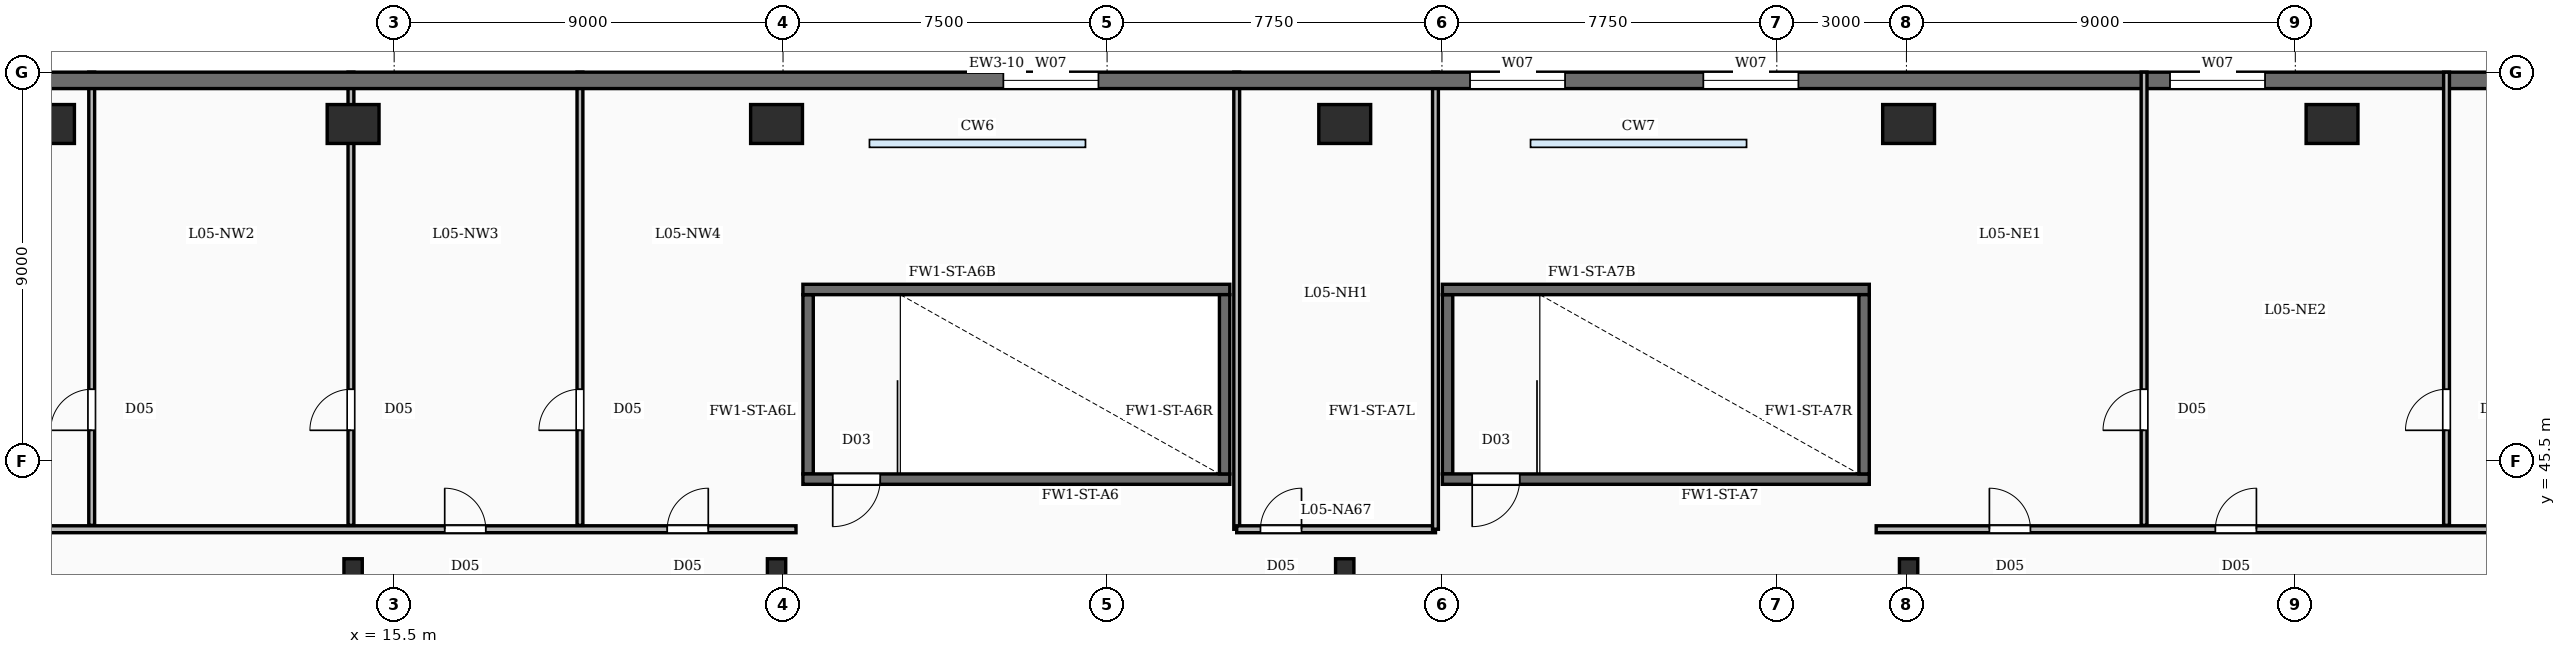
"""IFC4 building model, lengths in metres.
Left out: names, types, materials, properties, quantities, classifications, styles, units other than length and angle.
Written with IfcOpenShell. Run it as: python <this file> out.ifc"""

import sys

from ifc_helpers import new_model, si_unit, direction, frame, frame_2d, origin, origin_2d, place, context, subcontext, project, spatial, rectangle, i_section, extrude, element, fill, save


model = new_model("IFC4")
c1 = context("Model", 3, precision=1e-05, world=origin(), true_north=direction((0.0, 1.0)))
c2 = subcontext(c1, "Body", "Model", "MODEL_VIEW")
j1 = project(units=[si_unit("LENGTHUNIT", "METRE"), si_unit("PLANEANGLEUNIT", "RADIAN")], contexts=[c1])
p1 = place(None, origin())
s1 = spatial("IfcSite", under=j1, at=p1, CompositionType="ELEMENT")
p2 = place(p1, origin())
s2 = spatial("IfcBuilding", under=s1, at=p2, CompositionType="ELEMENT")
p3 = place(p2, frame((0.0, 0.0, 28.0)))
s3 = spatial("IfcBuildingStorey", under=s2, at=p3, CompositionType="ELEMENT", Elevation=28.0)
for number, where, z_axis, x_axis in (
    (1, (60.35, 53.3, -0.35), (0.0, 0.0, 1.0), (1.0, 0.0, 0.0)),
    (2, (50.55, 53.3, -0.35), (0.0, 0.0, 1.0), (1.0, 0.0, 0.0)),
    (3, (37.5, 53.3, -0.35), (0.0, 0.0, 1.0), (1.0, 0.0, 0.0)),
    (4, (24.35, 53.3, -0.35), (0.0, 0.0, 1.0), (1.0, 0.0, 0.0)),
    (5, (14.55, 53.3, -0.35), (0.0, 0.0, 1.0), (1.0, 0.0, 0.0)),
    (6, (7.5, 53.3, -0.35), (0.0, 0.0, 1.0), (1.0, 0.0, 0.0)),
):
    element("IfcColumn", number, at=place(p3, frame(where, z_axis=z_axis, x_axis=x_axis)), inside=s3, PredefinedType="COLUMN", context=c2, shape_type="SweptSolid", body=[
        extrude(rectangle(XDim=1.2, YDim=0.9, at=origin_2d()), origin(), (0.0, 0.0, 1.0), 5.9),
    ])
for number, where, z_axis, x_axis in (
    (7, (14.55, 43.0, -0.35), (0.0, 0.0, 1.0), (1.0, 0.0, 0.0)),
    (8, (24.35, 43.0, -0.35), (0.0, 0.0, 1.0), (1.0, 0.0, 0.0)),
    (9, (37.5, 43.0, -0.35), (0.0, 0.0, 1.0), (1.0, 0.0, 0.0)),
    (10, (50.55, 43.0, -0.35), (0.0, 0.0, 1.0), (1.0, 0.0, 0.0)),
):
    element("IfcColumn", number, at=place(p3, frame(where, z_axis=z_axis, x_axis=x_axis)), inside=s3, PredefinedType="COLUMN", context=c2, shape_type="SweptSolid", body=[
        extrude(i_section(OverallWidth=0.424, OverallDepth=0.474, WebThickness=0.048, FlangeThickness=0.077, FilletRadius=0.02, at=origin_2d()), origin(), (0.0, 0.0, 1.0), 5.9),
    ])
p4 = place(p3, frame((5.4, 54.31, 0.0), z_axis=(0.0, 0.0, 1.0), x_axis=(1.0, 0.0, 0.0)))
e11 = element("IfcWall", 11, at=p4, inside=s3, PredefinedType="SOLIDWALL", context=c2, shape_type="SweptSolid", body=[
    extrude(rectangle(XDim=68.7, YDim=0.38, at=frame_2d((34.35, 0.0))), origin(), (0.0, 0.0, 1.0), 5.55),
])
p5 = place(p4, frame((24.2, 0.0, 0.95)))
e12 = element("IfcOpeningElement", 12, at=p5, cuts=e11, PredefinedType="OPENING", context=c2, shape_type="SweptSolid", body=[
    extrude(rectangle(XDim=2.2, YDim=2.5, at=frame_2d((1.1, 1.25))), frame((0.0, 0.2, 0.0), z_axis=(0.0, -1.0, 0.0), x_axis=(1.0, 0.0, 0.0)), (0.0, 0.0, 1.0), 0.4),
])
p6 = place(p4, frame((35.0, 0.0, 0.95)))
e13 = element("IfcOpeningElement", 13, at=p6, cuts=e11, PredefinedType="OPENING", context=c2, shape_type="SweptSolid", body=[
    extrude(rectangle(XDim=2.2, YDim=2.5, at=frame_2d((1.1, 1.25))), frame((0.0, 0.2, 0.0), z_axis=(0.0, -1.0, 0.0), x_axis=(1.0, 0.0, 0.0)), (0.0, 0.0, 1.0), 0.4),
])
p7 = place(p4, frame((40.4, 0.0, 0.95)))
e14 = element("IfcOpeningElement", 14, at=p7, cuts=e11, PredefinedType="OPENING", context=c2, shape_type="SweptSolid", body=[
    extrude(rectangle(XDim=2.2, YDim=2.5, at=frame_2d((1.1, 1.25))), frame((0.0, 0.2, 0.0), z_axis=(0.0, -1.0, 0.0), x_axis=(1.0, 0.0, 0.0)), (0.0, 0.0, 1.0), 0.4),
])
p8 = place(p4, frame((51.2, 0.0, 0.95)))
e15 = element("IfcOpeningElement", 15, at=p8, cuts=e11, PredefinedType="OPENING", context=c2, shape_type="SweptSolid", body=[
    extrude(rectangle(XDim=2.2, YDim=2.5, at=frame_2d((1.1, 1.25))), frame((0.0, 0.2, 0.0), z_axis=(0.0, -1.0, 0.0), x_axis=(1.0, 0.0, 0.0)), (0.0, 0.0, 1.0), 0.4),
])
p9 = place(p3, frame((34.84, 45.08, 0.0), z_axis=(0.0, 0.0, 1.0), x_axis=(-1.0, 0.0, 0.0)))
e16 = element("IfcWall", 16, at=p9, inside=s3, PredefinedType="SOLIDWALL", context=c2, shape_type="SweptSolid", body=[
    extrude(rectangle(XDim=9.88, YDim=0.24, at=frame_2d((4.94, 0.0))), origin(), (0.0, 0.0, 1.0), 5.55),
])
p10 = place(p9, frame((8.09, 0.0, 0.0)))
e17 = element("IfcOpeningElement", 17, at=p10, cuts=e16, PredefinedType="OPENING", context=c2, shape_type="SweptSolid", body=[
    extrude(rectangle(XDim=1.1, YDim=2.15, at=frame_2d((0.55, 1.075))), frame((0.0, 0.13, 0.0), z_axis=(0.0, -1.0, 0.0), x_axis=(1.0, 0.0, 0.0)), (0.0, 0.0, 1.0), 0.26),
])
p11 = place(p3, frame((24.96, 49.47, 0.0), z_axis=(0.0, 0.0, 1.0), x_axis=(1.0, 0.0, 0.0)))
e18 = element("IfcWall", 18, at=p11, inside=s3, PredefinedType="SOLIDWALL", context=c2, shape_type="SweptSolid", body=[
    extrude(rectangle(XDim=9.88, YDim=0.24, at=frame_2d((4.94, 0.0))), origin(), (0.0, 0.0, 1.0), 5.55),
])
for number, where, z_axis, x_axis in (
    (19, (25.08, 45.2, 0.0), (0.0, 0.0, 1.0), (0.0, 1.0, 0.0)),
    (20, (34.72, 45.2, 0.0), (0.0, 0.0, 1.0), (0.0, 1.0, 0.0)),
):
    element("IfcWall", number, at=place(p3, frame(where, z_axis=z_axis, x_axis=x_axis)), inside=s3, PredefinedType="SOLIDWALL", context=c2, shape_type="SweptSolid", body=[
        extrude(rectangle(XDim=4.15, YDim=0.24, at=frame_2d((2.075, 0.0))), origin(), (0.0, 0.0, 1.0), 5.55),
    ])
p12 = place(p3, frame((49.64, 45.08, 0.0), z_axis=(0.0, 0.0, 1.0), x_axis=(-1.0, 0.0, 0.0)))
e21 = element("IfcWall", 21, at=p12, inside=s3, PredefinedType="SOLIDWALL", context=c2, shape_type="SweptSolid", body=[
    extrude(rectangle(XDim=9.88, YDim=0.24, at=frame_2d((4.94, 0.0))), origin(), (0.0, 0.0, 1.0), 5.55),
])
p13 = place(p12, frame((8.09, 0.0, 0.0)))
e22 = element("IfcOpeningElement", 22, at=p13, cuts=e21, PredefinedType="OPENING", context=c2, shape_type="SweptSolid", body=[
    extrude(rectangle(XDim=1.1, YDim=2.15, at=frame_2d((0.55, 1.075))), frame((0.0, 0.13, 0.0), z_axis=(0.0, -1.0, 0.0), x_axis=(1.0, 0.0, 0.0)), (0.0, 0.0, 1.0), 0.26),
])
p14 = place(p3, frame((39.76, 49.47, 0.0), z_axis=(0.0, 0.0, 1.0), x_axis=(1.0, 0.0, 0.0)))
e23 = element("IfcWall", 23, at=p14, inside=s3, PredefinedType="SOLIDWALL", context=c2, shape_type="SweptSolid", body=[
    extrude(rectangle(XDim=9.88, YDim=0.24, at=frame_2d((4.94, 0.0))), origin(), (0.0, 0.0, 1.0), 5.55),
])
for number, where, z_axis, x_axis in (
    (24, (39.88, 45.2, 0.0), (0.0, 0.0, 1.0), (0.0, 1.0, 0.0)),
    (25, (49.52, 45.2, 0.0), (0.0, 0.0, 1.0), (0.0, 1.0, 0.0)),
):
    element("IfcWall", number, at=place(p3, frame(where, z_axis=z_axis, x_axis=x_axis)), inside=s3, PredefinedType="SOLIDWALL", context=c2, shape_type="SweptSolid", body=[
        extrude(rectangle(XDim=4.15, YDim=0.24, at=frame_2d((2.075, 0.0))), origin(), (0.0, 0.0, 1.0), 5.55),
    ])
p15 = place(p3, frame((8.5, 44.01, 0.0), z_axis=(0.0, 0.0, 1.0), x_axis=(0.0, 1.0, 0.0)))
e26 = element("IfcWall", 26, at=p15, inside=s3, PredefinedType="PARTITIONING", context=c2, shape_type="SweptSolid", body=[
    extrude(rectangle(XDim=10.49, YDim=0.135, at=frame_2d((5.245, 0.0))), origin(), (0.0, 0.0, 1.0), 4.61),
])
p16 = place(p15, frame((2.2, 0.0, 0.0)))
e27 = element("IfcOpeningElement", 27, at=p16, cuts=e26, PredefinedType="OPENING", context=c2, shape_type="SweptSolid", body=[
    extrude(rectangle(XDim=0.95, YDim=2.15, at=frame_2d((0.475, 1.075))), frame((0.0, 0.077, 0.0), z_axis=(0.0, -1.0, 0.0), x_axis=(1.0, 0.0, 0.0)), (0.0, 0.0, 1.0), 0.155),
])
p17 = place(p3, frame((14.5, 44.01, 0.0), z_axis=(0.0, 0.0, 1.0), x_axis=(0.0, 1.0, 0.0)))
e28 = element("IfcWall", 28, at=p17, inside=s3, PredefinedType="PARTITIONING", context=c2, shape_type="SweptSolid", body=[
    extrude(rectangle(XDim=10.49, YDim=0.135, at=frame_2d((5.245, 0.0))), origin(), (0.0, 0.0, 1.0), 3.6),
])
p18 = place(p17, frame((2.2, 0.0, 0.0)))
e29 = element("IfcOpeningElement", 29, at=p18, cuts=e28, PredefinedType="OPENING", context=c2, shape_type="SweptSolid", body=[
    extrude(rectangle(XDim=0.95, YDim=2.15, at=frame_2d((0.475, 1.075))), frame((0.0, 0.077, 0.0), z_axis=(0.0, -1.0, 0.0), x_axis=(1.0, 0.0, 0.0)), (0.0, 0.0, 1.0), 0.155),
])
p19 = place(p3, frame((19.8, 44.01, 0.0), z_axis=(0.0, 0.0, 1.0), x_axis=(0.0, 1.0, 0.0)))
e30 = element("IfcWall", 30, at=p19, inside=s3, PredefinedType="PARTITIONING", context=c2, shape_type="SweptSolid", body=[
    extrude(rectangle(XDim=10.49, YDim=0.135, at=frame_2d((5.245, 0.0))), origin(), (0.0, 0.0, 1.0), 4.61),
])
p20 = place(p19, frame((2.2, 0.0, 0.0)))
e31 = element("IfcOpeningElement", 31, at=p20, cuts=e30, PredefinedType="OPENING", context=c2, shape_type="SweptSolid", body=[
    extrude(rectangle(XDim=0.95, YDim=2.15, at=frame_2d((0.475, 1.075))), frame((0.0, 0.077, 0.0), z_axis=(0.0, -1.0, 0.0), x_axis=(1.0, 0.0, 0.0)), (0.0, 0.0, 1.0), 0.155),
])
p21 = place(p3, frame((0.0, 43.92, 0.0), z_axis=(0.0, 0.0, 1.0), x_axis=(1.0, 0.0, 0.0)))
e32 = element("IfcWall", 32, at=p21, inside=s3, PredefinedType="PARTITIONING", context=c2, shape_type="SweptSolid", body=[
    extrude(rectangle(XDim=24.8, YDim=0.16, at=frame_2d((12.4, 0.0))), origin(), (0.0, 0.0, 1.0), 4.61),
])
p22 = place(p21, frame((16.67, 0.0, 0.0)))
e33 = element("IfcOpeningElement", 33, at=p22, cuts=e32, PredefinedType="OPENING", context=c2, shape_type="SweptSolid", body=[
    extrude(rectangle(XDim=0.95, YDim=2.15, at=frame_2d((0.475, 1.075))), frame((0.0, 0.09, 0.0), z_axis=(0.0, -1.0, 0.0), x_axis=(1.0, 0.0, 0.0)), (0.0, 0.0, 1.0), 0.18),
])
p23 = place(p21, frame((21.82, 0.0, 0.0)))
e34 = element("IfcOpeningElement", 34, at=p23, cuts=e32, PredefinedType="OPENING", context=c2, shape_type="SweptSolid", body=[
    extrude(rectangle(XDim=0.95, YDim=2.15, at=frame_2d((0.475, 1.075))), frame((0.0, 0.09, 0.0), z_axis=(0.0, -1.0, 0.0), x_axis=(1.0, 0.0, 0.0)), (0.0, 0.0, 1.0), 0.18),
])
p24 = place(p3, frame((56.0, 44.01, 0.0), z_axis=(0.0, 0.0, 1.0), x_axis=(0.0, 1.0, 0.0)))
e35 = element("IfcWall", 35, at=p24, inside=s3, PredefinedType="PARTITIONING", context=c2, shape_type="SweptSolid", body=[
    extrude(rectangle(XDim=10.49, YDim=0.135, at=frame_2d((5.245, 0.0))), origin(), (0.0, 0.0, 1.0), 4.61),
])
p25 = place(p24, frame((2.2, 0.0, 0.0)))
e36 = element("IfcOpeningElement", 36, at=p25, cuts=e35, PredefinedType="OPENING", context=c2, shape_type="SweptSolid", body=[
    extrude(rectangle(XDim=0.95, YDim=2.15, at=frame_2d((0.475, 1.075))), frame((0.0, 0.077, 0.0), z_axis=(0.0, -1.0, 0.0), x_axis=(1.0, 0.0, 0.0)), (0.0, 0.0, 1.0), 0.155),
])
p26 = place(p3, frame((63.0, 44.01, 0.0), z_axis=(0.0, 0.0, 1.0), x_axis=(0.0, 1.0, 0.0)))
e37 = element("IfcWall", 37, at=p26, inside=s3, PredefinedType="PARTITIONING", context=c2, shape_type="SweptSolid", body=[
    extrude(rectangle(XDim=10.49, YDim=0.135, at=frame_2d((5.245, 0.0))), origin(), (0.0, 0.0, 1.0), 4.61),
])
p27 = place(p26, frame((2.2, 0.0, 0.0)))
e38 = element("IfcOpeningElement", 38, at=p27, cuts=e37, PredefinedType="OPENING", context=c2, shape_type="SweptSolid", body=[
    extrude(rectangle(XDim=0.95, YDim=2.15, at=frame_2d((0.475, 1.075))), frame((0.0, 0.077, 0.0), z_axis=(0.0, -1.0, 0.0), x_axis=(1.0, 0.0, 0.0)), (0.0, 0.0, 1.0), 0.155),
])
p28 = place(p3, frame((49.8, 43.92, 0.0), z_axis=(0.0, 0.0, 1.0), x_axis=(1.0, 0.0, 0.0)))
e39 = element("IfcWall", 39, at=p28, inside=s3, PredefinedType="PARTITIONING", context=c2, shape_type="SweptSolid", body=[
    extrude(rectangle(XDim=29.7, YDim=0.16, at=frame_2d((14.85, 0.0))), origin(), (0.0, 0.0, 1.0), 4.61),
])
p29 = place(p28, frame((2.62, 0.0, 0.0)))
e40 = element("IfcOpeningElement", 40, at=p29, cuts=e39, PredefinedType="OPENING", context=c2, shape_type="SweptSolid", body=[
    extrude(rectangle(XDim=0.95, YDim=2.15, at=frame_2d((0.475, 1.075))), frame((0.0, 0.09, 0.0), z_axis=(0.0, -1.0, 0.0), x_axis=(1.0, 0.0, 0.0)), (0.0, 0.0, 1.0), 0.18),
])
p30 = place(p28, frame((7.85, 0.0, 0.0)))
e41 = element("IfcOpeningElement", 41, at=p30, cuts=e39, PredefinedType="OPENING", context=c2, shape_type="SweptSolid", body=[
    extrude(rectangle(XDim=0.95, YDim=2.15, at=frame_2d((0.475, 1.075))), frame((0.0, 0.09, 0.0), z_axis=(0.0, -1.0, 0.0), x_axis=(1.0, 0.0, 0.0)), (0.0, 0.0, 1.0), 0.18),
])
p31 = place(p28, frame((16.718, 0.0, 0.0)))
e42 = element("IfcOpeningElement", 42, at=p31, cuts=e39, PredefinedType="OPENING", context=c2, shape_type="SweptSolid", body=[
    extrude(rectangle(XDim=0.95, YDim=2.15, at=frame_2d((0.475, 1.075))), frame((0.0, 0.09, 0.0), z_axis=(0.0, -1.0, 0.0), x_axis=(1.0, 0.0, 0.0)), (0.0, 0.0, 1.0), 0.18),
])
p32 = place(p28, frame((21.02, 0.0, 0.0)))
e43 = element("IfcOpeningElement", 43, at=p32, cuts=e39, PredefinedType="OPENING", context=c2, shape_type="SweptSolid", body=[
    extrude(rectangle(XDim=0.95, YDim=2.15, at=frame_2d((0.475, 1.075))), frame((0.0, 0.09, 0.0), z_axis=(0.0, -1.0, 0.0), x_axis=(1.0, 0.0, 0.0)), (0.0, 0.0, 1.0), 0.18),
])
p33 = place(p3, frame((35.0, 43.92, 0.0), z_axis=(0.0, 0.0, 1.0), x_axis=(1.0, 0.0, 0.0)))
e44 = element("IfcWall", 44, at=p33, inside=s3, PredefinedType="PARTITIONING", context=c2, shape_type="SweptSolid", body=[
    extrude(rectangle(XDim=4.6, YDim=0.16, at=frame_2d((2.3, 0.0))), origin(), (0.0, 0.0, 1.0), 4.61),
])
p34 = place(p33, frame((0.55, 0.0, 0.0)))
e45 = element("IfcOpeningElement", 45, at=p34, cuts=e44, PredefinedType="OPENING", context=c2, shape_type="SweptSolid", body=[
    extrude(rectangle(XDim=0.95, YDim=2.15, at=frame_2d((0.475, 1.075))), frame((0.0, 0.09, 0.0), z_axis=(0.0, -1.0, 0.0), x_axis=(1.0, 0.0, 0.0)), (0.0, 0.0, 1.0), 0.18),
])
for number, where, z_axis, x_axis in (
    (46, (35.0, 43.92, 0.0), (0.0, 0.0, 1.0), (0.0, 1.0, 0.0)),
    (47, (39.6, 43.92, 0.0), (0.0, 0.0, 1.0), (0.0, 1.0, 0.0)),
):
    element("IfcWall", number, at=place(p3, frame(where, z_axis=z_axis, x_axis=x_axis)), inside=s3, PredefinedType="PARTITIONING", context=c2, shape_type="SweptSolid", body=[
        extrude(rectangle(XDim=10.58, YDim=0.135, at=frame_2d((5.29, 0.0))), origin(), (0.0, 0.0, 1.0), 4.61),
    ])
p35 = place(p5, origin())
e48 = element("IfcWindow", 48, at=p35, inside=s3, PartitioningType="DOUBLE_PANEL_VERTICAL", PredefinedType="WINDOW", context=c2, shape_type="SweptSolid", body=[
    extrude(rectangle(XDim=2.2, YDim=2.5, at=frame_2d((1.1, 1.25))), frame((0.0, 0.03, 0.0), z_axis=(0.0, -1.0, 0.0), x_axis=(1.0, 0.0, 0.0)), (0.0, 0.0, 1.0), 0.06),
])
fill(e12, e48)
p36 = place(p6, origin())
e49 = element("IfcWindow", 49, at=p36, inside=s3, PartitioningType="DOUBLE_PANEL_VERTICAL", PredefinedType="WINDOW", context=c2, shape_type="SweptSolid", body=[
    extrude(rectangle(XDim=2.2, YDim=2.5, at=frame_2d((1.1, 1.25))), frame((0.0, 0.03, 0.0), z_axis=(0.0, -1.0, 0.0), x_axis=(1.0, 0.0, 0.0)), (0.0, 0.0, 1.0), 0.06),
])
fill(e13, e49)
p37 = place(p7, origin())
e50 = element("IfcWindow", 50, at=p37, inside=s3, PartitioningType="DOUBLE_PANEL_VERTICAL", PredefinedType="WINDOW", context=c2, shape_type="SweptSolid", body=[
    extrude(rectangle(XDim=2.2, YDim=2.5, at=frame_2d((1.1, 1.25))), frame((0.0, 0.03, 0.0), z_axis=(0.0, -1.0, 0.0), x_axis=(1.0, 0.0, 0.0)), (0.0, 0.0, 1.0), 0.06),
])
fill(e14, e50)
p38 = place(p8, origin())
e51 = element("IfcWindow", 51, at=p38, inside=s3, PartitioningType="DOUBLE_PANEL_VERTICAL", PredefinedType="WINDOW", context=c2, shape_type="SweptSolid", body=[
    extrude(rectangle(XDim=2.2, YDim=2.5, at=frame_2d((1.1, 1.25))), frame((0.0, 0.03, 0.0), z_axis=(0.0, -1.0, 0.0), x_axis=(1.0, 0.0, 0.0)), (0.0, 0.0, 1.0), 0.06),
])
fill(e15, e51)
p39 = place(p10, origin())
e52 = element("IfcDoor", 52, at=p39, inside=s3, OperationType="SINGLE_SWING_RIGHT", PredefinedType="DOOR", context=c2, shape_type="SweptSolid", body=[
    extrude(rectangle(XDim=1.1, YDim=2.15, at=frame_2d((0.55, 1.075))), frame((0.0, 0.025, 0.0), z_axis=(0.0, -1.0, 0.0), x_axis=(1.0, 0.0, 0.0)), (0.0, 0.0, 1.0), 0.05),
])
fill(e17, e52)
p40 = place(p13, origin())
e53 = element("IfcDoor", 53, at=p40, inside=s3, OperationType="SINGLE_SWING_RIGHT", PredefinedType="DOOR", context=c2, shape_type="SweptSolid", body=[
    extrude(rectangle(XDim=1.1, YDim=2.15, at=frame_2d((0.55, 1.075))), frame((0.0, 0.025, 0.0), z_axis=(0.0, -1.0, 0.0), x_axis=(1.0, 0.0, 0.0)), (0.0, 0.0, 1.0), 0.05),
])
fill(e22, e53)
p41 = place(p16, origin())
e54 = element("IfcDoor", 54, at=p41, inside=s3, OperationType="SINGLE_SWING_LEFT", PredefinedType="DOOR", context=c2, shape_type="SweptSolid", body=[
    extrude(rectangle(XDim=0.95, YDim=2.15, at=frame_2d((0.475, 1.075))), frame((0.0, 0.025, 0.0), z_axis=(0.0, -1.0, 0.0), x_axis=(1.0, 0.0, 0.0)), (0.0, 0.0, 1.0), 0.05),
])
fill(e27, e54)
p42 = place(p18, origin())
e55 = element("IfcDoor", 55, at=p42, inside=s3, OperationType="SINGLE_SWING_LEFT", PredefinedType="DOOR", context=c2, shape_type="SweptSolid", body=[
    extrude(rectangle(XDim=0.95, YDim=2.15, at=frame_2d((0.475, 1.075))), frame((0.0, 0.025, 0.0), z_axis=(0.0, -1.0, 0.0), x_axis=(1.0, 0.0, 0.0)), (0.0, 0.0, 1.0), 0.05),
])
fill(e29, e55)
p43 = place(p20, origin())
e56 = element("IfcDoor", 56, at=p43, inside=s3, OperationType="SINGLE_SWING_LEFT", PredefinedType="DOOR", context=c2, shape_type="SweptSolid", body=[
    extrude(rectangle(XDim=0.95, YDim=2.15, at=frame_2d((0.475, 1.075))), frame((0.0, 0.025, 0.0), z_axis=(0.0, -1.0, 0.0), x_axis=(1.0, 0.0, 0.0)), (0.0, 0.0, 1.0), 0.05),
])
fill(e31, e56)
p44 = place(p22, origin())
e57 = element("IfcDoor", 57, at=p44, inside=s3, OperationType="SINGLE_SWING_LEFT", PredefinedType="DOOR", context=c2, shape_type="SweptSolid", body=[
    extrude(rectangle(XDim=0.95, YDim=2.15, at=frame_2d((0.475, 1.075))), frame((0.0, 0.025, 0.0), z_axis=(0.0, -1.0, 0.0), x_axis=(1.0, 0.0, 0.0)), (0.0, 0.0, 1.0), 0.05),
])
fill(e33, e57)
p45 = place(p23, origin())
e58 = element("IfcDoor", 58, at=p45, inside=s3, OperationType="SINGLE_SWING_RIGHT", PredefinedType="DOOR", context=c2, shape_type="SweptSolid", body=[
    extrude(rectangle(XDim=0.95, YDim=2.15, at=frame_2d((0.475, 1.075))), frame((0.0, 0.025, 0.0), z_axis=(0.0, -1.0, 0.0), x_axis=(1.0, 0.0, 0.0)), (0.0, 0.0, 1.0), 0.05),
])
fill(e34, e58)
p46 = place(p25, origin())
e59 = element("IfcDoor", 59, at=p46, inside=s3, OperationType="SINGLE_SWING_LEFT", PredefinedType="DOOR", context=c2, shape_type="SweptSolid", body=[
    extrude(rectangle(XDim=0.95, YDim=2.15, at=frame_2d((0.475, 1.075))), frame((0.0, 0.025, 0.0), z_axis=(0.0, -1.0, 0.0), x_axis=(1.0, 0.0, 0.0)), (0.0, 0.0, 1.0), 0.05),
])
fill(e36, e59)
p47 = place(p27, origin())
e60 = element("IfcDoor", 60, at=p47, inside=s3, OperationType="SINGLE_SWING_LEFT", PredefinedType="DOOR", context=c2, shape_type="SweptSolid", body=[
    extrude(rectangle(XDim=0.95, YDim=2.15, at=frame_2d((0.475, 1.075))), frame((0.0, 0.025, 0.0), z_axis=(0.0, -1.0, 0.0), x_axis=(1.0, 0.0, 0.0)), (0.0, 0.0, 1.0), 0.05),
])
fill(e38, e60)
p48 = place(p29, origin())
e61 = element("IfcDoor", 61, at=p48, inside=s3, OperationType="SINGLE_SWING_LEFT", PredefinedType="DOOR", context=c2, shape_type="SweptSolid", body=[
    extrude(rectangle(XDim=0.95, YDim=2.15, at=frame_2d((0.475, 1.075))), frame((0.0, 0.025, 0.0), z_axis=(0.0, -1.0, 0.0), x_axis=(1.0, 0.0, 0.0)), (0.0, 0.0, 1.0), 0.05),
])
fill(e40, e61)
p49 = place(p30, origin())
e62 = element("IfcDoor", 62, at=p49, inside=s3, OperationType="SINGLE_SWING_RIGHT", PredefinedType="DOOR", context=c2, shape_type="SweptSolid", body=[
    extrude(rectangle(XDim=0.95, YDim=2.15, at=frame_2d((0.475, 1.075))), frame((0.0, 0.025, 0.0), z_axis=(0.0, -1.0, 0.0), x_axis=(1.0, 0.0, 0.0)), (0.0, 0.0, 1.0), 0.05),
])
fill(e41, e62)
p50 = place(p34, origin())
e63 = element("IfcDoor", 63, at=p50, inside=s3, OperationType="SINGLE_SWING_RIGHT", PredefinedType="DOOR", context=c2, shape_type="SweptSolid", body=[
    extrude(rectangle(XDim=0.95, YDim=2.15, at=frame_2d((0.475, 1.075))), frame((0.0, 0.025, 0.0), z_axis=(0.0, -1.0, 0.0), x_axis=(1.0, 0.0, 0.0)), (0.0, 0.0, 1.0), 0.05),
])
fill(e45, e63)
save(model, sys.argv[1])
